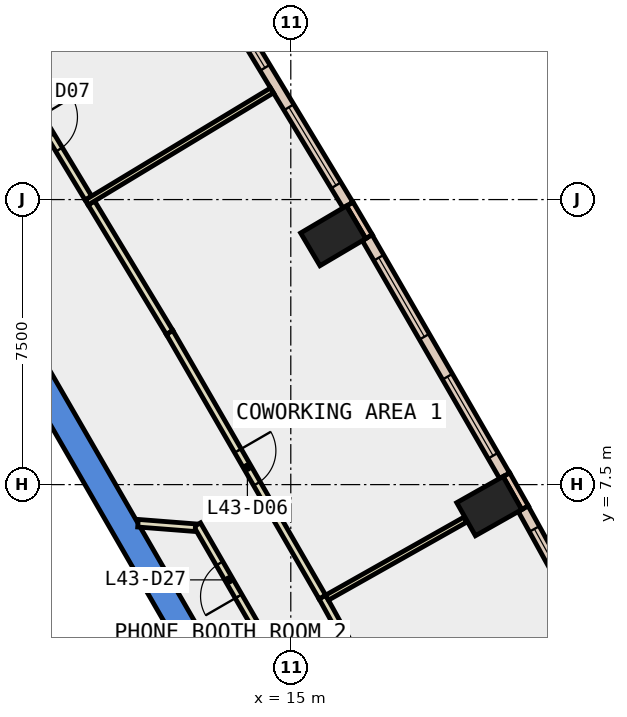
"""IFC4 building model, lengths in metres.
Left out: names, types, materials, properties, quantities, classifications, styles, units other than length and angle.
Written with IfcOpenShell. Run it as: python <this file> out.ifc"""

import sys

from ifc_helpers import new_model, si_unit, direction, frame, frame_2d, origin, origin_2d, place, context, subcontext, project, spatial, polyline, rectangle, outline, extrude, element, fill, save


model = new_model("IFC4")
c1 = context("Model", 3, precision=1e-05, world=origin(), true_north=direction((0.0, 1.0)))
c2 = subcontext(c1, "Body", "Model", "MODEL_VIEW")
j1 = project(units=[si_unit("LENGTHUNIT", "METRE"), si_unit("PLANEANGLEUNIT", "RADIAN")], contexts=[c1])
p1 = place(None, origin())
s1 = spatial("IfcSite", under=j1, at=p1, CompositionType="ELEMENT")
p2 = place(p1, origin())
s2 = spatial("IfcBuilding", under=s1, at=p2, CompositionType="ELEMENT")
p3 = place(p2, frame((0.0, 0.0, 194.0)))
s3 = spatial("IfcBuildingStorey", under=s2, at=p3, CompositionType="ELEMENT", Elevation=194.0)
for number, where, z_axis, x_axis in (
    (1, (20.222, 6.934, -0.4), (0.0, 0.0, 1.0), (-0.491, 0.871, 0.0)),
    (2, (16.116, 14.046, -0.4), (0.0, 0.0, 1.0), (-0.509, 0.861, 0.0)),
):
    element("IfcColumn", number, at=place(p3, frame(where, z_axis=z_axis, x_axis=x_axis)), inside=s3, PredefinedType="COLUMN", context=c2, shape_type="SweptSolid", body=[
        extrude(rectangle(XDim=1.0, YDim=1.4, at=origin_2d()), origin(), (0.0, 0.0, 1.0), 4.2),
    ])
p4 = place(p3, frame((0.0, 0.0, -0.4)))
e3 = element("IfcWall", 3, at=p4, inside=s3, PredefinedType="SHEAR", context=c2, shape_type="SweptSolid", body=[
    extrude(outline(polyline([(8.084, 11.498), (7.478, 11.148), (12.471, 2.5), (13.279, 2.5), (8.084, 11.498)])), origin(), (0.0, 0.0, 1.0), 4.2),
])
p5 = place(p3, frame((21.165, 6.891, 0.0), z_axis=(0.0, 0.0, 1.0), x_axis=(-0.491848119507, 0.870681013539, 0.0)))
e4 = element("IfcWall", 4, at=p5, inside=s3, PredefinedType="STANDARD", context=c2, shape_type="SweptSolid", body=[
    extrude(rectangle(XDim=1.0, YDim=0.2, at=frame_2d((0.5, 0.0))), origin(), (0.0, 0.0, 1.0), 3.8),
])
p6 = place(p3, frame((17.059, 14.023, 0.0), z_axis=(0.0, 0.0, 1.0), x_axis=(-0.508161541526, 0.861261776531, 0.0)))
e5 = element("IfcWall", 5, at=p6, inside=s3, PredefinedType="STANDARD", context=c2, shape_type="SweptSolid", body=[
    extrude(rectangle(XDim=1.0, YDim=0.2, at=frame_2d((0.5, 0.0))), origin(), (0.0, 0.0, 1.0), 3.8),
])
p7 = place(p3, frame((24.607, 0.534, 0.0), z_axis=(0.0, 0.0, 1.0), x_axis=(-0.482862185961, 0.875696356832, 0.0)))
e6 = element("IfcWall", 6, at=p7, inside=s3, PredefinedType="STANDARD", context=c2, shape_type="SweptSolid", body=[
    extrude(rectangle(XDim=7.23, YDim=0.3, at=frame_2d((3.615, 0.0))), origin(), (0.0, 0.0, 1.0), 3.8),
])
p8 = place(p7, frame((0.607, 0.0, 0.9)))
e7 = element("IfcOpeningElement", 7, at=p8, cuts=e6, PredefinedType="OPENING", context=c2, shape_type="SweptSolid", body=[
    extrude(rectangle(XDim=2.4, YDim=2.6, at=frame_2d((1.2, 1.3))), frame((0.0, 0.16, 0.0), z_axis=(0.0, -1.0, 0.0), x_axis=(1.0, 0.0, 0.0)), (0.0, 0.0, 1.0), 0.32),
])
p9 = place(p7, frame((4.222, 0.0, 0.9)))
e8 = element("IfcOpeningElement", 8, at=p9, cuts=e6, PredefinedType="OPENING", context=c2, shape_type="SweptSolid", body=[
    extrude(rectangle(XDim=2.4, YDim=2.6, at=frame_2d((1.2, 1.3))), frame((0.0, 0.16, 0.0), z_axis=(0.0, -1.0, 0.0), x_axis=(1.0, 0.0, 0.0)), (0.0, 0.0, 1.0), 0.32),
])
p10 = place(p3, frame((20.626, 7.734, 0.0), z_axis=(0.0, 0.0, 1.0), x_axis=(-0.499948481376, 0.866055146033, 0.0)))
e9 = element("IfcWall", 9, at=p10, inside=s3, PredefinedType="STANDARD", context=c2, shape_type="SweptSolid", body=[
    extrude(rectangle(XDim=7.231, YDim=0.3, at=frame_2d((3.615, 0.0))), origin(), (0.0, 0.0, 1.0), 3.8),
])
p11 = place(p10, frame((0.608, 0.0, 0.9)))
e10 = element("IfcOpeningElement", 10, at=p11, cuts=e9, PredefinedType="OPENING", context=c2, shape_type="SweptSolid", body=[
    extrude(rectangle(XDim=2.4, YDim=2.6, at=frame_2d((1.2, 1.3))), frame((0.0, 0.16, 0.0), z_axis=(0.0, -1.0, 0.0), x_axis=(1.0, 0.0, 0.0)), (0.0, 0.0, 1.0), 0.32),
])
p12 = place(p10, frame((4.223, 0.0, 0.9)))
e11 = element("IfcOpeningElement", 11, at=p12, cuts=e9, PredefinedType="OPENING", context=c2, shape_type="SweptSolid", body=[
    extrude(rectangle(XDim=2.4, YDim=2.6, at=frame_2d((1.2, 1.3))), frame((0.0, 0.16, 0.0), z_axis=(0.0, -1.0, 0.0), x_axis=(1.0, 0.0, 0.0)), (0.0, 0.0, 1.0), 0.32),
])
p13 = place(p3, frame((16.504, 14.855, 0.0), z_axis=(0.0, 0.0, 1.0), x_axis=(-0.517159962006, 0.855888762456, 0.0)))
e12 = element("IfcWall", 12, at=p13, inside=s3, PredefinedType="STANDARD", context=c2, shape_type="SweptSolid", body=[
    extrude(rectangle(XDim=7.23, YDim=0.3, at=frame_2d((3.615, 0.0))), origin(), (0.0, 0.0, 1.0), 3.8),
])
p14 = place(p13, frame((0.607, 0.0, 0.9)))
e13 = element("IfcOpeningElement", 13, at=p14, cuts=e12, PredefinedType="OPENING", context=c2, shape_type="SweptSolid", body=[
    extrude(rectangle(XDim=2.4, YDim=2.6, at=frame_2d((1.2, 1.3))), frame((0.0, 0.16, 0.0), z_axis=(0.0, -1.0, 0.0), x_axis=(1.0, 0.0, 0.0)), (0.0, 0.0, 1.0), 0.32),
])
p15 = place(p13, frame((4.222, 0.0, 0.9)))
e14 = element("IfcOpeningElement", 14, at=p15, cuts=e12, PredefinedType="OPENING", context=c2, shape_type="SweptSolid", body=[
    extrude(rectangle(XDim=2.4, YDim=2.6, at=frame_2d((1.2, 1.3))), frame((0.0, 0.16, 0.0), z_axis=(0.0, -1.0, 0.0), x_axis=(1.0, 0.0, 0.0)), (0.0, 0.0, 1.0), 0.32),
])
p16 = place(p3, frame((14.213, 3.543, 0.0), z_axis=(0.0, 0.0, 1.0), x_axis=(-0.500182898346, 0.865919781621, 0.0)))
e15 = element("IfcWall", 15, at=p16, inside=s3, PredefinedType="PARTITIONING", context=c2, shape_type="SweptSolid", body=[
    extrude(rectangle(XDim=3.35, YDim=0.2, at=frame_2d((1.675, 0.0))), origin(), (0.0, 0.0, 1.0), 3.8),
])
p17 = place(p16, frame((1.175, 0.0, 0.0)))
e16 = element("IfcOpeningElement", 16, at=p17, cuts=e15, PredefinedType="OPENING", context=c2, shape_type="SweptSolid", body=[
    extrude(rectangle(XDim=1.0, YDim=2.1, at=frame_2d((0.5, 1.05))), frame((0.0, 0.11, 0.0), z_axis=(0.0, -1.0, 0.0), x_axis=(1.0, 0.0, 0.0)), (0.0, 0.0, 1.0), 0.22),
])
p18 = place(p3, frame((12.488, 6.366, 0.0), z_axis=(0.0, 0.0, 1.0), x_axis=(-0.996960771308, 0.077905201835, 0.0)))
e17 = element("IfcWall", 17, at=p18, inside=s3, PredefinedType="PARTITIONING", context=c2, shape_type="SweptSolid", body=[
    extrude(rectangle(XDim=1.514, YDim=0.2, at=frame_2d((0.757, 0.0))), origin(), (0.0, 0.0, 1.0), 3.8),
])
p19 = place(p3, frame((15.831, 4.542, 0.0), z_axis=(0.0, 0.0, 1.0), x_axis=(0.482835531749, -0.875711053533, 0.0)))
e18 = element("IfcWall", 18, at=p19, inside=s3, PredefinedType="PARTITIONING", context=c2, shape_type="SweptSolid", body=[
    extrude(rectangle(XDim=8.115, YDim=0.2, at=frame_2d((4.057, 0.0))), origin(), (0.0, 0.0, 1.0), 3.8),
])
p20 = place(p19, frame((3.632, 0.0, 0.0)))
e19 = element("IfcOpeningElement", 19, at=p20, cuts=e18, PredefinedType="OPENING", context=c2, shape_type="SweptSolid", body=[
    extrude(rectangle(XDim=1.0, YDim=2.1, at=frame_2d((0.5, 1.05))), frame((0.0, 0.11, 0.0), z_axis=(0.0, -1.0, 0.0), x_axis=(1.0, 0.0, 0.0)), (0.0, 0.0, 1.0), 0.22),
])
p21 = place(p3, frame((9.752, 14.911, 0.0), z_axis=(0.0, 0.0, 1.0), x_axis=(0.517135291957, -0.855903668535, 0.0)))
e20 = element("IfcWall", 20, at=p21, inside=s3, PredefinedType="PARTITIONING", context=c2, shape_type="SweptSolid", body=[
    extrude(rectangle(XDim=3.982, YDim=0.2, at=frame_2d((1.991, 0.0))), origin(), (0.0, 0.0, 1.0), 3.8),
])
p22 = place(p3, frame((11.811, 11.503, 0.0), z_axis=(0.0, 0.0, 1.0), x_axis=(0.500013420409, -0.866017655369, 0.0)))
e21 = element("IfcWall", 21, at=p22, inside=s3, PredefinedType="PARTITIONING", context=c2, shape_type="SweptSolid", body=[
    extrude(rectangle(XDim=8.038, YDim=0.2, at=frame_2d((4.019, 0.0))), origin(), (0.0, 0.0, 1.0), 3.8),
])
p23 = place(p22, frame((3.594, 0.0, 0.0)))
e22 = element("IfcOpeningElement", 22, at=p23, cuts=e21, PredefinedType="OPENING", context=c2, shape_type="SweptSolid", body=[
    extrude(rectangle(XDim=1.0, YDim=2.1, at=frame_2d((0.5, 1.05))), frame((0.0, 0.11, 0.0), z_axis=(0.0, -1.0, 0.0), x_axis=(1.0, 0.0, 0.0)), (0.0, 0.0, 1.0), 0.22),
])
p24 = place(p3, frame((7.615, 18.449, 0.0), z_axis=(0.0, 0.0, 1.0), x_axis=(0.516918251554, -0.856034766356, 0.0)))
e23 = element("IfcWall", 23, at=p24, inside=s3, PredefinedType="PARTITIONING", context=c2, shape_type="SweptSolid", body=[
    extrude(rectangle(XDim=3.983, YDim=0.2, at=frame_2d((1.992, 0.0))), origin(), (0.0, 0.0, 1.0), 3.8),
])
p25 = place(p24, frame((1.492, 0.0, 0.0)))
e24 = element("IfcOpeningElement", 24, at=p25, cuts=e23, PredefinedType="OPENING", context=c2, shape_type="SweptSolid", body=[
    extrude(rectangle(XDim=1.0, YDim=2.1, at=frame_2d((0.5, 1.05))), frame((0.0, 0.11, 0.0), z_axis=(0.0, -1.0, 0.0), x_axis=(1.0, 0.0, 0.0)), (0.0, 0.0, 1.0), 0.22),
])
p26 = place(p3, frame((15.954, 4.526, 0.0), z_axis=(0.0, 0.0, 1.0), x_axis=(0.870940016277, 0.491389344663, 0.0)))
e25 = element("IfcWall", 25, at=p26, inside=s3, PredefinedType="PARTITIONING", context=c2, shape_type="SweptSolid", body=[
    extrude(rectangle(XDim=4.18, YDim=0.15, at=frame_2d((2.09, 0.0))), origin(), (0.0, 0.0, 1.0), 3.8),
])
p27 = place(p3, frame((9.628, 14.924, 0.0), z_axis=(0.0, 0.0, 1.0), x_axis=(0.855931736607, 0.517088834021, 0.0)))
e26 = element("IfcWall", 26, at=p27, inside=s3, PredefinedType="PARTITIONING", context=c2, shape_type="SweptSolid", body=[
    extrude(rectangle(XDim=5.699, YDim=0.15, at=frame_2d((2.85, 0.0))), origin(), (0.0, 0.0, 1.0), 3.8),
])
p28 = place(p9, origin())
e27 = element("IfcWindow", 27, at=p28, inside=s3, PartitioningType="SINGLE_PANEL", PredefinedType="WINDOW", context=c2, shape_type="SweptSolid", body=[
    extrude(rectangle(XDim=2.4, YDim=2.6, at=frame_2d((1.2, 1.3))), frame((0.0, 0.03, 0.0), z_axis=(0.0, -1.0, 0.0), x_axis=(1.0, 0.0, 0.0)), (0.0, 0.0, 1.0), 0.06),
])
fill(e8, e27)
p29 = place(p11, origin())
e28 = element("IfcWindow", 28, at=p29, inside=s3, PartitioningType="SINGLE_PANEL", PredefinedType="WINDOW", context=c2, shape_type="SweptSolid", body=[
    extrude(rectangle(XDim=2.4, YDim=2.6, at=frame_2d((1.2, 1.3))), frame((0.0, 0.03, 0.0), z_axis=(0.0, -1.0, 0.0), x_axis=(1.0, 0.0, 0.0)), (0.0, 0.0, 1.0), 0.06),
])
fill(e10, e28)
p30 = place(p12, origin())
e29 = element("IfcWindow", 29, at=p30, inside=s3, PartitioningType="SINGLE_PANEL", PredefinedType="WINDOW", context=c2, shape_type="SweptSolid", body=[
    extrude(rectangle(XDim=2.4, YDim=2.6, at=frame_2d((1.2, 1.3))), frame((0.0, 0.03, 0.0), z_axis=(0.0, -1.0, 0.0), x_axis=(1.0, 0.0, 0.0)), (0.0, 0.0, 1.0), 0.06),
])
fill(e11, e29)
p31 = place(p14, origin())
e30 = element("IfcWindow", 30, at=p31, inside=s3, PartitioningType="SINGLE_PANEL", PredefinedType="WINDOW", context=c2, shape_type="SweptSolid", body=[
    extrude(rectangle(XDim=2.4, YDim=2.6, at=frame_2d((1.2, 1.3))), frame((0.0, 0.03, 0.0), z_axis=(0.0, -1.0, 0.0), x_axis=(1.0, 0.0, 0.0)), (0.0, 0.0, 1.0), 0.06),
])
fill(e13, e30)
p32 = place(p15, origin())
e31 = element("IfcWindow", 31, at=p32, inside=s3, PartitioningType="SINGLE_PANEL", PredefinedType="WINDOW", context=c2, shape_type="SweptSolid", body=[
    extrude(rectangle(XDim=2.4, YDim=2.6, at=frame_2d((1.2, 1.3))), frame((0.0, 0.03, 0.0), z_axis=(0.0, -1.0, 0.0), x_axis=(1.0, 0.0, 0.0)), (0.0, 0.0, 1.0), 0.06),
])
fill(e14, e31)
p33 = place(p23, origin())
e32 = element("IfcDoor", 32, at=p33, inside=s3, OperationType="SINGLE_SWING_LEFT", PredefinedType="DOOR", context=c2, shape_type="SweptSolid", body=[
    extrude(rectangle(XDim=1.0, YDim=2.1, at=frame_2d((0.5, 1.05))), frame((0.0, 0.025, 0.0), z_axis=(0.0, -1.0, 0.0), x_axis=(1.0, 0.0, 0.0)), (0.0, 0.0, 1.0), 0.05),
])
fill(e22, e32)
p34 = place(p25, origin())
e33 = element("IfcDoor", 33, at=p34, inside=s3, OperationType="SINGLE_SWING_LEFT", PredefinedType="DOOR", context=c2, shape_type="SweptSolid", body=[
    extrude(rectangle(XDim=1.0, YDim=2.1, at=frame_2d((0.5, 1.05))), frame((0.0, 0.025, 0.0), z_axis=(0.0, -1.0, 0.0), x_axis=(1.0, 0.0, 0.0)), (0.0, 0.0, 1.0), 0.05),
])
fill(e24, e33)
p35 = place(p17, origin())
e34 = element("IfcDoor", 34, at=p35, inside=s3, OperationType="SINGLE_SWING_LEFT", PredefinedType="DOOR", context=c2, shape_type="SweptSolid", body=[
    extrude(rectangle(XDim=1.0, YDim=2.1, at=frame_2d((0.5, 1.05))), frame((0.0, 0.025, 0.0), z_axis=(0.0, -1.0, 0.0), x_axis=(1.0, 0.0, 0.0)), (0.0, 0.0, 1.0), 0.05),
])
fill(e16, e34)
save(model, sys.argv[1])
